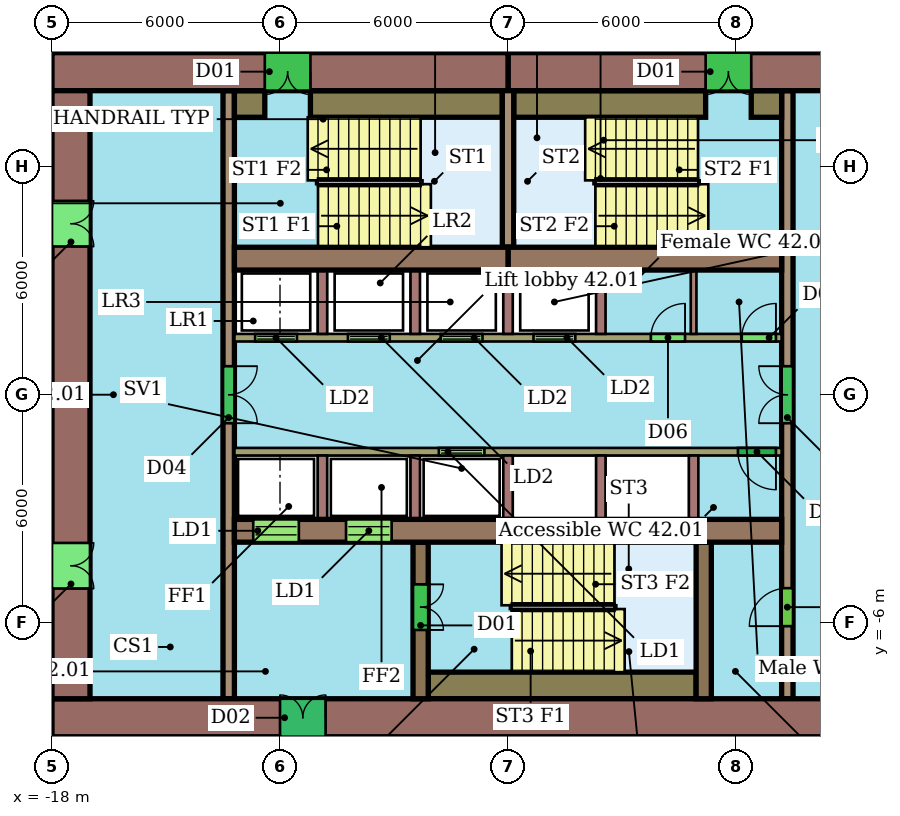
"""IFC4 building model, lengths in metres.
Left out: names, types, materials, properties, quantities, classifications, styles, units other than length and angle.
Written with IfcOpenShell. Run it as: python <this file> out.ifc"""

import sys

from ifc_helpers import new_model, si_unit, direction, frame, frame_2d, origin, place, context, subcontext, project, spatial, rectangle, extrude, element, fill, save


model = new_model("IFC4")
c1 = context("Model", 3, precision=1e-05, world=origin(), true_north=direction((0.0, 1.0)))
c2 = subcontext(c1, "Body", "Model", "MODEL_VIEW")
j1 = project(units=[si_unit("LENGTHUNIT", "METRE"), si_unit("PLANEANGLEUNIT", "RADIAN")], contexts=[c1])
p1 = place(None, origin())
s1 = spatial("IfcSite", under=j1, at=p1, CompositionType="ELEMENT")
p2 = place(p1, origin())
s2 = spatial("IfcBuilding", under=s1, at=p2, CompositionType="ELEMENT")
p3 = place(p2, frame((0.0, 0.0, 175.8)))
s3 = spatial("IfcBuildingStorey", under=s2, at=p3, CompositionType="ELEMENT", Elevation=175.8)
p4 = place(p3, frame((6.0, 8.5, 0.0), z_axis=(0.0, 0.0, 1.0), x_axis=(-1.0, 0.0, 0.0)))
e1 = element("IfcWall", 1, at=p4, inside=s3, PredefinedType="SHEAR", context=c2, shape_type="SweptSolid", body=[
    extrude(rectangle(XDim=12.0, YDim=1.0, at=frame_2d((6.0, 0.0))), origin(), (0.0, 0.0, 1.0), 3.3),
])
p5 = place(p4, frame((5.6, 0.0, 0.0)))
e2 = element("IfcOpeningElement", 2, at=p5, cuts=e1, PredefinedType="OPENING", context=c2, shape_type="SweptSolid", body=[
    extrude(rectangle(XDim=1.2, YDim=2.1, at=frame_2d((0.6, 1.05))), frame((0.0, 0.51, 0.0), z_axis=(0.0, -1.0, 0.0), x_axis=(1.0, 0.0, 0.0)), (0.0, 0.0, 1.0), 1.02),
])
p6 = place(p3, frame((-6.0, 8.5, 0.0), z_axis=(0.0, 0.0, 1.0), x_axis=(-1.0, 0.0, 0.0)))
e3 = element("IfcWall", 3, at=p6, inside=s3, PredefinedType="SHEAR", context=c2, shape_type="SweptSolid", body=[
    extrude(rectangle(XDim=12.0, YDim=1.0, at=frame_2d((6.0, 0.0))), origin(), (0.0, 0.0, 1.0), 3.3),
])
p7 = place(p6, frame((5.2, 0.0, 0.0)))
e4 = element("IfcOpeningElement", 4, at=p7, cuts=e3, PredefinedType="OPENING", context=c2, shape_type="SweptSolid", body=[
    extrude(rectangle(XDim=1.2, YDim=2.1, at=frame_2d((0.6, 1.05))), frame((0.0, 0.51, 0.0), z_axis=(0.0, -1.0, 0.0), x_axis=(1.0, 0.0, 0.0)), (0.0, 0.0, 1.0), 1.02),
])
p8 = place(p3, frame((-18.0, -8.5, 0.0), z_axis=(0.0, 0.0, 1.0), x_axis=(1.0, 0.0, 0.0)))
e5 = element("IfcWall", 5, at=p8, inside=s3, PredefinedType="SHEAR", context=c2, shape_type="SweptSolid", body=[
    extrude(rectangle(XDim=24.0, YDim=1.0, at=frame_2d((12.0, 0.0))), origin(), (0.0, 0.0, 1.0), 3.3),
])
p9 = place(p8, frame((6.0, 0.0, 0.0)))
e6 = element("IfcOpeningElement", 6, at=p9, cuts=e5, PredefinedType="OPENING", context=c2, shape_type="SweptSolid", body=[
    extrude(rectangle(XDim=1.2, YDim=2.1, at=frame_2d((0.6, 1.05))), frame((0.0, 0.51, 0.0), z_axis=(0.0, -1.0, 0.0), x_axis=(1.0, 0.0, 0.0)), (0.0, 0.0, 1.0), 1.02),
])
p10 = place(p3, frame((-17.5, 8.0, 0.0), z_axis=(0.0, 0.0, 1.0), x_axis=(0.0, -1.0, 0.0)))
e7 = element("IfcWall", 7, at=p10, inside=s3, PredefinedType="SHEAR", context=c2, shape_type="SweptSolid", body=[
    extrude(rectangle(XDim=16.0, YDim=1.0, at=frame_2d((8.0, 0.0))), origin(), (0.0, 0.0, 1.0), 3.3),
])
p11 = place(p10, frame((11.9, 0.0, 0.0)))
e8 = element("IfcOpeningElement", 8, at=p11, cuts=e7, PredefinedType="OPENING", context=c2, shape_type="SweptSolid", body=[
    extrude(rectangle(XDim=1.2, YDim=2.1, at=frame_2d((0.6, 1.05))), frame((0.0, 0.51, 0.0), z_axis=(0.0, -1.0, 0.0), x_axis=(1.0, 0.0, 0.0)), (0.0, 0.0, 1.0), 1.02),
])
p12 = place(p10, frame((2.9, 0.0, 0.0)))
e9 = element("IfcOpeningElement", 9, at=p12, cuts=e7, PredefinedType="OPENING", context=c2, shape_type="SweptSolid", body=[
    extrude(rectangle(XDim=1.2, YDim=2.1, at=frame_2d((0.6, 1.05))), frame((0.0, 0.51, 0.0), z_axis=(0.0, -1.0, 0.0), x_axis=(1.0, 0.0, 0.0)), (0.0, 0.0, 1.0), 1.02),
])
for number, where, z_axis, x_axis in (
    (10, (-13.2, 3.58, 0.0), (0.0, 0.0, 1.0), (1.0, 0.0, 0.0)),
    (11, (-6.0, 3.58, 0.0), (0.0, 0.0, 1.0), (1.0, 0.0, 0.0)),
):
    element("IfcWall", number, at=place(p3, frame(where, z_axis=z_axis, x_axis=x_axis)), inside=s3, PredefinedType="SHEAR", context=c2, shape_type="SweptSolid", body=[
        extrude(rectangle(XDim=7.2, YDim=0.6, at=frame_2d((3.6, 0.0))), origin(), (0.0, 0.0, 1.0), 3.3),
    ])
p13 = place(p3, frame((-13.2, -3.58, 0.0), z_axis=(0.0, 0.0, 1.0), x_axis=(1.0, 0.0, 0.0)))
e12 = element("IfcWall", 12, at=p13, inside=s3, PredefinedType="SHEAR", context=c2, shape_type="SweptSolid", body=[
    extrude(rectangle(XDim=7.2, YDim=0.6, at=frame_2d((3.6, 0.0))), origin(), (0.0, 0.0, 1.0), 3.3),
])
p14 = place(p13, frame((0.496, 0.0, 0.0)))
e13 = element("IfcOpeningElement", 13, at=p14, cuts=e12, PredefinedType="OPENING", context=c2, shape_type="SweptSolid", body=[
    extrude(rectangle(XDim=1.2, YDim=2.1, at=frame_2d((0.6, 1.05))), frame((0.0, 0.31, 0.0), z_axis=(0.0, -1.0, 0.0), x_axis=(1.0, 0.0, 0.0)), (0.0, 0.0, 1.0), 0.62),
])
p15 = place(p13, frame((2.938, 0.0, 0.0)))
e14 = element("IfcOpeningElement", 14, at=p15, cuts=e12, PredefinedType="OPENING", context=c2, shape_type="SweptSolid", body=[
    extrude(rectangle(XDim=1.2, YDim=2.1, at=frame_2d((0.6, 1.05))), frame((0.0, 0.31, 0.0), z_axis=(0.0, -1.0, 0.0), x_axis=(1.0, 0.0, 0.0)), (0.0, 0.0, 1.0), 0.62),
])
p16 = place(p3, frame((-6.0, -3.58, 0.0), z_axis=(0.0, 0.0, 1.0), x_axis=(1.0, 0.0, 0.0)))
e15 = element("IfcWall", 15, at=p16, inside=s3, PredefinedType="SHEAR", context=c2, shape_type="SweptSolid", body=[
    extrude(rectangle(XDim=7.2, YDim=0.6, at=frame_2d((3.6, 0.0))), origin(), (0.0, 0.0, 1.0), 3.3),
])
p17 = place(p3, frame((-13.35, 8.0, 0.0), z_axis=(0.0, 0.0, 1.0), x_axis=(0.0, -1.0, 0.0)))
e16 = element("IfcWall", 16, at=p17, inside=s3, PredefinedType="SHEAR", context=c2, shape_type="SweptSolid", body=[
    extrude(rectangle(XDim=16.0, YDim=0.3, at=frame_2d((8.0, 0.0))), origin(), (0.0, 0.0, 1.0), 3.3),
])
p18 = place(p17, frame((7.25, 0.0, 0.0)))
e17 = element("IfcOpeningElement", 17, at=p18, cuts=e16, PredefinedType="OPENING", context=c2, shape_type="SweptSolid", body=[
    extrude(rectangle(XDim=1.5, YDim=2.1, at=frame_2d((0.75, 1.05))), frame((0.0, 0.16, 0.0), z_axis=(0.0, -1.0, 0.0), x_axis=(1.0, 0.0, 0.0)), (0.0, 0.0, 1.0), 0.32),
])
p19 = place(p3, frame((1.35, -8.0, 0.0), z_axis=(0.0, 0.0, 1.0), x_axis=(0.0, 1.0, 0.0)))
e18 = element("IfcWall", 18, at=p19, inside=s3, PredefinedType="SHEAR", context=c2, shape_type="SweptSolid", body=[
    extrude(rectangle(XDim=16.0, YDim=0.3, at=frame_2d((8.0, 0.0))), origin(), (0.0, 0.0, 1.0), 3.3),
])
p20 = place(p19, frame((1.91, 0.0, 0.0)))
e19 = element("IfcOpeningElement", 19, at=p20, cuts=e18, PredefinedType="OPENING", context=c2, shape_type="SweptSolid", body=[
    extrude(rectangle(XDim=1.0, YDim=2.1, at=frame_2d((0.5, 1.05))), frame((0.0, 0.16, 0.0), z_axis=(0.0, -1.0, 0.0), x_axis=(1.0, 0.0, 0.0)), (0.0, 0.0, 1.0), 0.32),
])
p21 = place(p19, frame((7.25, 0.0, 0.0)))
e20 = element("IfcOpeningElement", 20, at=p21, cuts=e18, PredefinedType="OPENING", context=c2, shape_type="SweptSolid", body=[
    extrude(rectangle(XDim=1.5, YDim=2.1, at=frame_2d((0.75, 1.05))), frame((0.0, 0.16, 0.0), z_axis=(0.0, -1.0, 0.0), x_axis=(1.0, 0.0, 0.0)), (0.0, 0.0, 1.0), 0.32),
])
p22 = place(p3, frame((-13.2, 1.5, 0.0), z_axis=(0.0, 0.0, 1.0), x_axis=(1.0, 0.0, 0.0)))
e21 = element("IfcWall", 21, at=p22, inside=s3, PredefinedType="SHEAR", context=c2, shape_type="SweptSolid", body=[
    extrude(rectangle(XDim=14.4, YDim=0.2, at=frame_2d((7.2, 0.0))), origin(), (0.0, 0.0, 1.0), 3.3),
])
p23 = place(p22, frame((0.546, 0.0, 0.0)))
e22 = element("IfcOpeningElement", 22, at=p23, cuts=e21, PredefinedType="OPENING", context=c2, shape_type="SweptSolid", body=[
    extrude(rectangle(XDim=1.1, YDim=2.1, at=frame_2d((0.55, 1.05))), frame((0.0, 0.11, 0.0), z_axis=(0.0, -1.0, 0.0), x_axis=(1.0, 0.0, 0.0)), (0.0, 0.0, 1.0), 0.22),
])
p24 = place(p22, frame((2.988, 0.0, 0.0)))
e23 = element("IfcOpeningElement", 23, at=p24, cuts=e21, PredefinedType="OPENING", context=c2, shape_type="SweptSolid", body=[
    extrude(rectangle(XDim=1.1, YDim=2.1, at=frame_2d((0.55, 1.05))), frame((0.0, 0.11, 0.0), z_axis=(0.0, -1.0, 0.0), x_axis=(1.0, 0.0, 0.0)), (0.0, 0.0, 1.0), 0.22),
])
p25 = place(p22, frame((5.429, 0.0, 0.0)))
e24 = element("IfcOpeningElement", 24, at=p25, cuts=e21, PredefinedType="OPENING", context=c2, shape_type="SweptSolid", body=[
    extrude(rectangle(XDim=1.1, YDim=2.1, at=frame_2d((0.55, 1.05))), frame((0.0, 0.11, 0.0), z_axis=(0.0, -1.0, 0.0), x_axis=(1.0, 0.0, 0.0)), (0.0, 0.0, 1.0), 0.22),
])
p26 = place(p22, frame((7.871, 0.0, 0.0)))
e25 = element("IfcOpeningElement", 25, at=p26, cuts=e21, PredefinedType="OPENING", context=c2, shape_type="SweptSolid", body=[
    extrude(rectangle(XDim=1.1, YDim=2.1, at=frame_2d((0.55, 1.05))), frame((0.0, 0.11, 0.0), z_axis=(0.0, -1.0, 0.0), x_axis=(1.0, 0.0, 0.0)), (0.0, 0.0, 1.0), 0.22),
])
p27 = place(p22, frame((10.958, 0.0, 0.0)))
e26 = element("IfcOpeningElement", 26, at=p27, cuts=e21, PredefinedType="OPENING", context=c2, shape_type="SweptSolid", body=[
    extrude(rectangle(XDim=0.9, YDim=2.1, at=frame_2d((0.45, 1.05))), frame((0.0, 0.11, 0.0), z_axis=(0.0, -1.0, 0.0), x_axis=(1.0, 0.0, 0.0)), (0.0, 0.0, 1.0), 0.22),
])
p28 = place(p22, frame((13.35, 0.0, 0.0)))
e27 = element("IfcOpeningElement", 27, at=p28, cuts=e21, PredefinedType="OPENING", context=c2, shape_type="SweptSolid", body=[
    extrude(rectangle(XDim=0.9, YDim=2.1, at=frame_2d((0.45, 1.05))), frame((0.0, 0.11, 0.0), z_axis=(0.0, -1.0, 0.0), x_axis=(1.0, 0.0, 0.0)), (0.0, 0.0, 1.0), 0.22),
])
p29 = place(p3, frame((1.2, -1.5, 0.0), z_axis=(0.0, 0.0, 1.0), x_axis=(-1.0, 0.0, 0.0)))
e28 = element("IfcWall", 28, at=p29, inside=s3, PredefinedType="SHEAR", context=c2, shape_type="SweptSolid", body=[
    extrude(rectangle(XDim=14.4, YDim=0.2, at=frame_2d((7.2, 0.0))), origin(), (0.0, 0.0, 1.0), 3.3),
])
p30 = place(p29, frame((7.821, 0.0, 0.0)))
e29 = element("IfcOpeningElement", 29, at=p30, cuts=e28, PredefinedType="OPENING", context=c2, shape_type="SweptSolid", body=[
    extrude(rectangle(XDim=1.2, YDim=2.1, at=frame_2d((0.6, 1.05))), frame((0.0, 0.11, 0.0), z_axis=(0.0, -1.0, 0.0), x_axis=(1.0, 0.0, 0.0)), (0.0, 0.0, 1.0), 0.22),
])
p31 = place(p29, frame((0.15, 0.0, 0.0)))
e30 = element("IfcOpeningElement", 30, at=p31, cuts=e28, PredefinedType="OPENING", context=c2, shape_type="SweptSolid", body=[
    extrude(rectangle(XDim=1.0, YDim=2.1, at=frame_2d((0.5, 1.05))), frame((0.0, 0.11, 0.0), z_axis=(0.0, -1.0, 0.0), x_axis=(1.0, 0.0, 0.0)), (0.0, 0.0, 1.0), 0.22),
])
p32 = place(p3, frame((-8.3, -3.88, 0.0), z_axis=(0.0, 0.0, 1.0), x_axis=(0.0, -1.0, 0.0)))
e31 = element("IfcWall", 31, at=p32, inside=s3, PredefinedType="SHEAR", context=c2, shape_type="SweptSolid", body=[
    extrude(rectangle(XDim=4.12, YDim=0.4, at=frame_2d((2.06, 0.0))), origin(), (0.0, 0.0, 1.0), 3.3),
])
p33 = place(p32, frame((1.11, 0.0, 0.0)))
e32 = element("IfcOpeningElement", 32, at=p33, cuts=e31, PredefinedType="OPENING", context=c2, shape_type="SweptSolid", body=[
    extrude(rectangle(XDim=1.2, YDim=2.1, at=frame_2d((0.6, 1.05))), frame((0.0, 0.21, 0.0), z_axis=(0.0, -1.0, 0.0), x_axis=(1.0, 0.0, 0.0)), (0.0, 0.0, 1.0), 0.42),
])
p34 = place(p3, frame((-0.85, -3.88, 0.0), z_axis=(0.0, 0.0, 1.0), x_axis=(0.0, -1.0, 0.0)))
e33 = element("IfcWall", 33, at=p34, inside=s3, PredefinedType="SHEAR", context=c2, shape_type="SweptSolid", body=[
    extrude(rectangle(XDim=4.12, YDim=0.4, at=frame_2d((2.06, 0.0))), origin(), (0.0, 0.0, 1.0), 3.3),
])
p35 = place(p3, frame((-6.0, 3.88, 0.0), z_axis=(0.0, 0.0, 1.0), x_axis=(0.0, 1.0, 0.0)))
e34 = element("IfcWall", 34, at=p35, inside=s3, PredefinedType="SHEAR", context=c2, shape_type="SweptSolid", body=[
    extrude(rectangle(XDim=4.12, YDim=0.3, at=frame_2d((2.06, 0.0))), origin(), (0.0, 0.0, 1.0), 3.3),
])
p36 = place(p3, frame((-13.2, 7.65, 0.0), z_axis=(0.0, 0.0, 1.0), x_axis=(1.0, 0.0, 0.0)))
e35 = element("IfcWall", 35, at=p36, inside=s3, PredefinedType="SHEAR", context=c2, shape_type="SweptSolid", body=[
    extrude(rectangle(XDim=0.8, YDim=0.7, at=frame_2d((0.4, 0.0))), origin(), (0.0, 0.0, 1.0), 3.3),
])
for number, where, z_axis, x_axis in (
    (36, (-11.2, 7.65, 0.0), (0.0, 0.0, 1.0), (1.0, 0.0, 0.0)),
    (37, (-5.85, 7.65, 0.0), (0.0, 0.0, 1.0), (1.0, 0.0, 0.0)),
):
    element("IfcWall", number, at=place(p3, frame(where, z_axis=z_axis, x_axis=x_axis)), inside=s3, PredefinedType="SHEAR", context=c2, shape_type="SweptSolid", body=[
        extrude(rectangle(XDim=5.05, YDim=0.7, at=frame_2d((2.525, 0.0))), origin(), (0.0, 0.0, 1.0), 3.3),
    ])
p37 = place(p3, frame((0.4, 7.65, 0.0), z_axis=(0.0, 0.0, 1.0), x_axis=(1.0, 0.0, 0.0)))
e38 = element("IfcWall", 38, at=p37, inside=s3, PredefinedType="SHEAR", context=c2, shape_type="SweptSolid", body=[
    extrude(rectangle(XDim=0.8, YDim=0.7, at=frame_2d((0.4, 0.0))), origin(), (0.0, 0.0, 1.0), 3.3),
])
p38 = place(p3, frame((-8.1, -7.65, 0.0), z_axis=(0.0, 0.0, 1.0), x_axis=(1.0, 0.0, 0.0)))
e39 = element("IfcWall", 39, at=p38, inside=s3, PredefinedType="SHEAR", context=c2, shape_type="SweptSolid", body=[
    extrude(rectangle(XDim=7.05, YDim=0.7, at=frame_2d((3.525, 0.0))), origin(), (0.0, 0.0, 1.0), 3.3),
])
for number, where, z_axis, x_axis in (
    (40, (-10.883, 1.6, 0.0), (0.0, 0.0, 1.0), (0.0, 1.0, 0.0)),
    (41, (-8.442, 1.6, 0.0), (0.0, 0.0, 1.0), (0.0, 1.0, 0.0)),
    (42, (-6.0, 1.6, 0.0), (0.0, 0.0, 1.0), (0.0, 1.0, 0.0)),
    (43, (-3.558, 1.6, 0.0), (0.0, 0.0, 1.0), (0.0, 1.0, 0.0)),
):
    element("IfcWall", number, at=place(p3, frame(where, z_axis=z_axis, x_axis=x_axis)), inside=s3, PredefinedType="SHEAR", context=c2, shape_type="SweptSolid", body=[
        extrude(rectangle(XDim=1.68, YDim=0.25, at=frame_2d((0.84, 0.0))), origin(), (0.0, 0.0, 1.0), 3.3),
    ])
p39 = place(p3, frame((-1.117, 1.6, 0.0), z_axis=(0.0, 0.0, 1.0), x_axis=(0.0, 1.0, 0.0)))
e44 = element("IfcWall", 44, at=p39, inside=s3, PredefinedType="PARTITIONING", context=c2, shape_type="SweptSolid", body=[
    extrude(rectangle(XDim=1.68, YDim=0.15, at=frame_2d((0.84, 0.0))), origin(), (0.0, 0.0, 1.0), 3.3),
])
for number, where, z_axis, x_axis in (
    (45, (-10.883, -1.6, 0.0), (0.0, 0.0, 1.0), (0.0, -1.0, 0.0)),
    (46, (-8.442, -1.6, 0.0), (0.0, 0.0, 1.0), (0.0, -1.0, 0.0)),
    (47, (-6.0, -1.6, 0.0), (0.0, 0.0, 1.0), (0.0, -1.0, 0.0)),
    (48, (-3.558, -1.6, 0.0), (0.0, 0.0, 1.0), (0.0, -1.0, 0.0)),
    (49, (-1.117, -1.6, 0.0), (0.0, 0.0, 1.0), (0.0, -1.0, 0.0)),
):
    element("IfcWall", number, at=place(p3, frame(where, z_axis=z_axis, x_axis=x_axis)), inside=s3, PredefinedType="SHEAR", context=c2, shape_type="SweptSolid", body=[
        extrude(rectangle(XDim=1.68, YDim=0.25, at=frame_2d((0.84, 0.0))), origin(), (0.0, 0.0, 1.0), 3.3),
    ])
p40 = place(p5, origin())
e50 = element("IfcDoor", 50, at=p40, inside=s3, OperationType="DOUBLE_DOOR_SINGLE_SWING", PredefinedType="NOTDEFINED", context=c2, shape_type="SweptSolid", body=[
    extrude(rectangle(XDim=1.2, YDim=2.1, at=frame_2d((0.6, 1.05))), frame((0.0, 0.025, 0.0), z_axis=(0.0, -1.0, 0.0), x_axis=(1.0, 0.0, 0.0)), (0.0, 0.0, 1.0), 0.05),
])
fill(e2, e50)
p41 = place(p7, origin())
e51 = element("IfcDoor", 51, at=p41, inside=s3, OperationType="DOUBLE_DOOR_SINGLE_SWING", PredefinedType="NOTDEFINED", context=c2, shape_type="SweptSolid", body=[
    extrude(rectangle(XDim=1.2, YDim=2.1, at=frame_2d((0.6, 1.05))), frame((0.0, 0.025, 0.0), z_axis=(0.0, -1.0, 0.0), x_axis=(1.0, 0.0, 0.0)), (0.0, 0.0, 1.0), 0.05),
])
fill(e4, e51)
p42 = place(p9, origin())
e52 = element("IfcDoor", 52, at=p42, inside=s3, OperationType="DOUBLE_DOOR_SINGLE_SWING", PredefinedType="NOTDEFINED", context=c2, shape_type="SweptSolid", body=[
    extrude(rectangle(XDim=1.2, YDim=2.1, at=frame_2d((0.6, 1.05))), frame((0.0, 0.025, 0.0), z_axis=(0.0, -1.0, 0.0), x_axis=(1.0, 0.0, 0.0)), (0.0, 0.0, 1.0), 0.05),
])
fill(e6, e52)
p43 = place(p11, origin())
e53 = element("IfcDoor", 53, at=p43, inside=s3, OperationType="DOUBLE_DOOR_SINGLE_SWING", PredefinedType="NOTDEFINED", context=c2, shape_type="SweptSolid", body=[
    extrude(rectangle(XDim=1.2, YDim=2.1, at=frame_2d((0.6, 1.05))), frame((0.0, 0.025, 0.0), z_axis=(0.0, -1.0, 0.0), x_axis=(1.0, 0.0, 0.0)), (0.0, 0.0, 1.0), 0.05),
])
fill(e8, e53)
p44 = place(p12, origin())
e54 = element("IfcDoor", 54, at=p44, inside=s3, OperationType="DOUBLE_DOOR_SINGLE_SWING", PredefinedType="NOTDEFINED", context=c2, shape_type="SweptSolid", body=[
    extrude(rectangle(XDim=1.2, YDim=2.1, at=frame_2d((0.6, 1.05))), frame((0.0, 0.025, 0.0), z_axis=(0.0, -1.0, 0.0), x_axis=(1.0, 0.0, 0.0)), (0.0, 0.0, 1.0), 0.05),
])
fill(e9, e54)
p45 = place(p14, origin())
e55 = element("IfcDoor", 55, at=p45, inside=s3, OperationType="DOUBLE_DOOR_SLIDING", PredefinedType="NOTDEFINED", context=c2, shape_type="SweptSolid", body=[
    extrude(rectangle(XDim=1.2, YDim=2.1, at=frame_2d((0.6, 1.05))), frame((0.0, 0.025, 0.0), z_axis=(0.0, -1.0, 0.0), x_axis=(1.0, 0.0, 0.0)), (0.0, 0.0, 1.0), 0.05),
])
fill(e13, e55)
p46 = place(p15, origin())
e56 = element("IfcDoor", 56, at=p46, inside=s3, OperationType="DOUBLE_DOOR_SLIDING", PredefinedType="NOTDEFINED", context=c2, shape_type="SweptSolid", body=[
    extrude(rectangle(XDim=1.2, YDim=2.1, at=frame_2d((0.6, 1.05))), frame((0.0, 0.025, 0.0), z_axis=(0.0, -1.0, 0.0), x_axis=(1.0, 0.0, 0.0)), (0.0, 0.0, 1.0), 0.05),
])
fill(e14, e56)
p47 = place(p18, origin())
e57 = element("IfcDoor", 57, at=p47, inside=s3, OperationType="DOUBLE_DOOR_SINGLE_SWING", PredefinedType="NOTDEFINED", context=c2, shape_type="SweptSolid", body=[
    extrude(rectangle(XDim=1.5, YDim=2.1, at=frame_2d((0.75, 1.05))), frame((0.0, 0.025, 0.0), z_axis=(0.0, -1.0, 0.0), x_axis=(1.0, 0.0, 0.0)), (0.0, 0.0, 1.0), 0.05),
])
fill(e17, e57)
p48 = place(p20, origin())
e58 = element("IfcDoor", 58, at=p48, inside=s3, OperationType="SINGLE_SWING_LEFT", PredefinedType="NOTDEFINED", context=c2, shape_type="SweptSolid", body=[
    extrude(rectangle(XDim=1.0, YDim=2.1, at=frame_2d((0.5, 1.05))), frame((0.0, 0.025, 0.0), z_axis=(0.0, -1.0, 0.0), x_axis=(1.0, 0.0, 0.0)), (0.0, 0.0, 1.0), 0.05),
])
fill(e19, e58)
p49 = place(p21, origin())
e59 = element("IfcDoor", 59, at=p49, inside=s3, OperationType="DOUBLE_DOOR_SINGLE_SWING", PredefinedType="NOTDEFINED", context=c2, shape_type="SweptSolid", body=[
    extrude(rectangle(XDim=1.5, YDim=2.1, at=frame_2d((0.75, 1.05))), frame((0.0, 0.025, 0.0), z_axis=(0.0, -1.0, 0.0), x_axis=(1.0, 0.0, 0.0)), (0.0, 0.0, 1.0), 0.05),
])
fill(e20, e59)
p50 = place(p23, origin())
e60 = element("IfcDoor", 60, at=p50, inside=s3, OperationType="DOUBLE_DOOR_SLIDING", PredefinedType="NOTDEFINED", context=c2, shape_type="SweptSolid", body=[
    extrude(rectangle(XDim=1.1, YDim=2.1, at=frame_2d((0.55, 1.05))), frame((0.0, 0.025, 0.0), z_axis=(0.0, -1.0, 0.0), x_axis=(1.0, 0.0, 0.0)), (0.0, 0.0, 1.0), 0.05),
])
fill(e22, e60)
p51 = place(p24, origin())
e61 = element("IfcDoor", 61, at=p51, inside=s3, OperationType="DOUBLE_DOOR_SLIDING", PredefinedType="NOTDEFINED", context=c2, shape_type="SweptSolid", body=[
    extrude(rectangle(XDim=1.1, YDim=2.1, at=frame_2d((0.55, 1.05))), frame((0.0, 0.025, 0.0), z_axis=(0.0, -1.0, 0.0), x_axis=(1.0, 0.0, 0.0)), (0.0, 0.0, 1.0), 0.05),
])
fill(e23, e61)
p52 = place(p25, origin())
e62 = element("IfcDoor", 62, at=p52, inside=s3, OperationType="DOUBLE_DOOR_SLIDING", PredefinedType="NOTDEFINED", context=c2, shape_type="SweptSolid", body=[
    extrude(rectangle(XDim=1.1, YDim=2.1, at=frame_2d((0.55, 1.05))), frame((0.0, 0.025, 0.0), z_axis=(0.0, -1.0, 0.0), x_axis=(1.0, 0.0, 0.0)), (0.0, 0.0, 1.0), 0.05),
])
fill(e24, e62)
p53 = place(p26, origin())
e63 = element("IfcDoor", 63, at=p53, inside=s3, OperationType="DOUBLE_DOOR_SLIDING", PredefinedType="NOTDEFINED", context=c2, shape_type="SweptSolid", body=[
    extrude(rectangle(XDim=1.1, YDim=2.1, at=frame_2d((0.55, 1.05))), frame((0.0, 0.025, 0.0), z_axis=(0.0, -1.0, 0.0), x_axis=(1.0, 0.0, 0.0)), (0.0, 0.0, 1.0), 0.05),
])
fill(e25, e63)
p54 = place(p27, origin())
e64 = element("IfcDoor", 64, at=p54, inside=s3, OperationType="SINGLE_SWING_RIGHT", PredefinedType="NOTDEFINED", context=c2, shape_type="SweptSolid", body=[
    extrude(rectangle(XDim=0.9, YDim=2.1, at=frame_2d((0.45, 1.05))), frame((0.0, 0.025, 0.0), z_axis=(0.0, -1.0, 0.0), x_axis=(1.0, 0.0, 0.0)), (0.0, 0.0, 1.0), 0.05),
])
fill(e26, e64)
p55 = place(p28, origin())
e65 = element("IfcDoor", 65, at=p55, inside=s3, OperationType="SINGLE_SWING_RIGHT", PredefinedType="NOTDEFINED", context=c2, shape_type="SweptSolid", body=[
    extrude(rectangle(XDim=0.9, YDim=2.1, at=frame_2d((0.45, 1.05))), frame((0.0, 0.025, 0.0), z_axis=(0.0, -1.0, 0.0), x_axis=(1.0, 0.0, 0.0)), (0.0, 0.0, 1.0), 0.05),
])
fill(e27, e65)
p56 = place(p30, origin())
e66 = element("IfcDoor", 66, at=p56, inside=s3, OperationType="DOUBLE_DOOR_SLIDING", PredefinedType="NOTDEFINED", context=c2, shape_type="SweptSolid", body=[
    extrude(rectangle(XDim=1.2, YDim=2.1, at=frame_2d((0.6, 1.05))), frame((0.0, 0.025, 0.0), z_axis=(0.0, -1.0, 0.0), x_axis=(1.0, 0.0, 0.0)), (0.0, 0.0, 1.0), 0.05),
])
fill(e29, e66)
p57 = place(p31, origin())
e67 = element("IfcDoor", 67, at=p57, inside=s3, OperationType="SINGLE_SWING_LEFT", PredefinedType="NOTDEFINED", context=c2, shape_type="SweptSolid", body=[
    extrude(rectangle(XDim=1.0, YDim=2.1, at=frame_2d((0.5, 1.05))), frame((0.0, 0.025, 0.0), z_axis=(0.0, -1.0, 0.0), x_axis=(1.0, 0.0, 0.0)), (0.0, 0.0, 1.0), 0.05),
])
fill(e30, e67)
p58 = place(p33, origin())
e68 = element("IfcDoor", 68, at=p58, inside=s3, OperationType="DOUBLE_DOOR_SINGLE_SWING", PredefinedType="NOTDEFINED", context=c2, shape_type="SweptSolid", body=[
    extrude(rectangle(XDim=1.2, YDim=2.1, at=frame_2d((0.6, 1.05))), frame((0.0, 0.025, 0.0), z_axis=(0.0, -1.0, 0.0), x_axis=(1.0, 0.0, 0.0)), (0.0, 0.0, 1.0), 0.05),
])
fill(e32, e68)
save(model, sys.argv[1])
